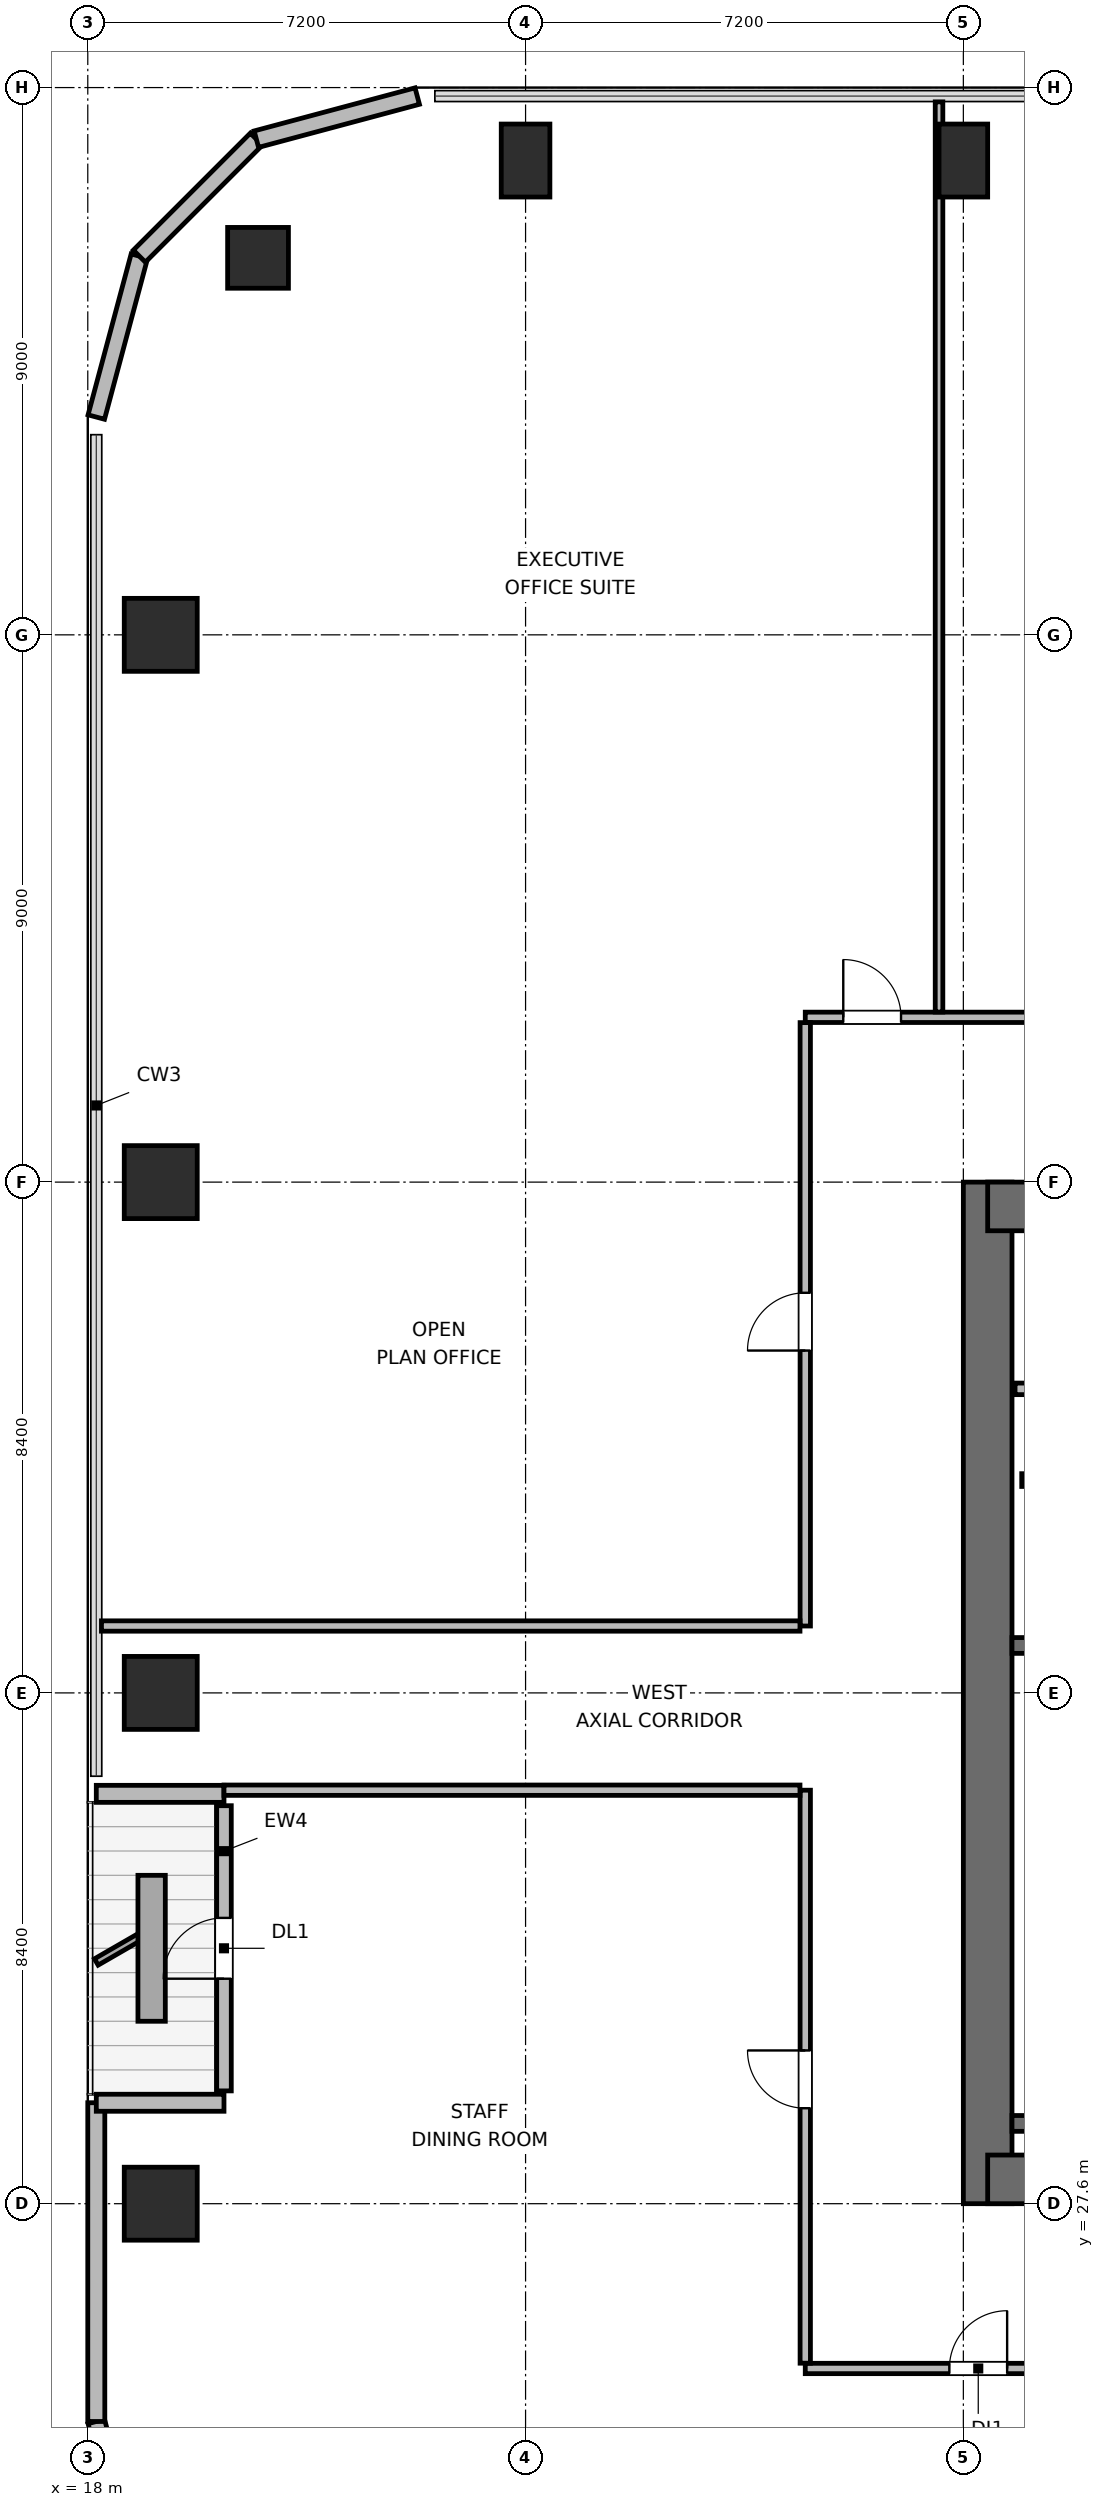
"""IFC4 building model, lengths in metres.
Left out: names, types, materials, properties, quantities, classifications, styles, units other than length and angle.
Written with IfcOpenShell. Run it as: python <this file> out.ifc"""

import sys

from ifc_helpers import new_model, si_unit, direction, frame, frame_2d, origin, origin_2d, place, context, subcontext, project, spatial, rectangle, circle, extrude, element, fill, save


model = new_model("IFC4")
c1 = context("Model", 3, precision=1e-05, world=origin(), true_north=direction((0.0, 1.0)))
c2 = subcontext(c1, "Body", "Model", "MODEL_VIEW")
j1 = project(units=[si_unit("LENGTHUNIT", "METRE"), si_unit("PLANEANGLEUNIT", "RADIAN")], contexts=[c1])
p1 = place(None, origin())
s1 = spatial("IfcSite", under=j1, at=p1, CompositionType="ELEMENT")
p2 = place(p1, origin())
s2 = spatial("IfcBuilding", under=s1, at=p2, CompositionType="ELEMENT")
p3 = place(p2, frame((0.0, 0.0, 170.1)))
s3 = spatial("IfcBuildingStorey", under=s2, at=p3, CompositionType="ELEMENT", Elevation=170.1)
p4 = place(p3, frame((32.8, 27.6, 0.0), z_axis=(0.0, 0.0, 1.0), x_axis=(0.0, 1.0, 0.0)))
e1 = element("IfcWall", 1, at=p4, inside=s3, PredefinedType="SHEAR", context=c2, shape_type="SweptSolid", body=[
    extrude(rectangle(XDim=16.8, YDim=0.8, at=frame_2d((8.4, 0.0))), origin(), (0.0, 0.0, 1.0), 3.9),
])
p5 = place(p3, frame((32.8, 28.0, 0.0), z_axis=(0.0, 0.0, 1.0), x_axis=(1.0, 0.0, 0.0)))
e2 = element("IfcWall", 2, at=p5, inside=s3, PredefinedType="SHEAR", context=c2, shape_type="SweptSolid", body=[
    extrude(rectangle(XDim=9.2, YDim=0.8, at=frame_2d((4.6, 0.0))), origin(), (0.0, 0.0, 1.0), 3.9),
])
p6 = place(p5, frame((5.025, 0.0, 0.0)))
e3 = element("IfcOpeningElement", 3, at=p6, cuts=e2, PredefinedType="OPENING", context=c2, shape_type="SweptSolid", body=[
    extrude(rectangle(XDim=1.05, YDim=2.04, at=frame_2d((0.525, 1.02))), frame((0.0, 0.41, 0.0), z_axis=(0.0, -1.0, 0.0), x_axis=(1.0, 0.0, 0.0)), (0.0, 0.0, 1.0), 0.82),
])
p7 = place(p3, frame((32.8, 44.0, 0.0), z_axis=(0.0, 0.0, 1.0), x_axis=(1.0, 0.0, 0.0)))
e4 = element("IfcWall", 4, at=p7, inside=s3, PredefinedType="SHEAR", context=c2, shape_type="SweptSolid", body=[
    extrude(rectangle(XDim=9.2, YDim=0.8, at=frame_2d((4.6, 0.0))), origin(), (0.0, 0.0, 1.0), 3.9),
])
p8 = place(p7, frame((1.025, 0.0, 0.0)))
e5 = element("IfcOpeningElement", 5, at=p8, cuts=e4, PredefinedType="OPENING", context=c2, shape_type="SweptSolid", body=[
    extrude(rectangle(XDim=0.95, YDim=2.04, at=frame_2d((0.475, 1.02))), frame((0.0, 0.41, 0.0), z_axis=(0.0, -1.0, 0.0), x_axis=(1.0, 0.0, 0.0)), (0.0, 0.0, 1.0), 0.82),
])
p9 = place(p7, frame((4.275, 0.0, 0.0)))
e6 = element("IfcOpeningElement", 6, at=p9, cuts=e4, PredefinedType="OPENING", context=c2, shape_type="SweptSolid", body=[
    extrude(rectangle(XDim=0.9, YDim=2.02, at=frame_2d((0.45, 1.01))), frame((0.0, 0.41, 0.0), z_axis=(0.0, -1.0, 0.0), x_axis=(1.0, 0.0, 0.0)), (0.0, 0.0, 1.0), 0.82),
])
p10 = place(p7, frame((7.175, 0.0, 0.0)))
e7 = element("IfcOpeningElement", 7, at=p10, cuts=e4, PredefinedType="OPENING", context=c2, shape_type="SweptSolid", body=[
    extrude(rectangle(XDim=0.9, YDim=2.02, at=frame_2d((0.45, 1.01))), frame((0.0, 0.41, 0.0), z_axis=(0.0, -1.0, 0.0), x_axis=(1.0, 0.0, 0.0)), (0.0, 0.0, 1.0), 0.82),
])
for number, where, z_axis, x_axis in (
    (8, (33.2, 28.92, 0.0), (0.0, 0.0, 1.0), (1.0, 0.0, 0.0)),
    (9, (33.2, 36.78, 0.0), (0.0, 0.0, 1.0), (1.0, 0.0, 0.0)),
):
    element("IfcWall", number, at=place(p3, frame(where, z_axis=z_axis, x_axis=x_axis)), inside=s3, PredefinedType="SHEAR", context=c2, shape_type="SweptSolid", body=[
        extrude(rectangle(XDim=3.91, YDim=0.26, at=frame_2d((1.955, 0.0))), origin(), (0.0, 0.0, 1.0), 3.9),
    ])
p11 = place(p3, frame((20.8, 59.6, 0.0), z_axis=(0.0, 0.0, 1.0), x_axis=(1.0, 0.0, 0.0)))
e10 = element("IfcColumn", 10, at=p11, inside=s3, PredefinedType="COLUMN", context=c2, shape_type="SweptSolid", body=[
    extrude(circle(Radius=0.5, at=origin_2d()), origin(), (0.0, 0.0, 1.0), 3.9),
])
for number, where, z_axis, x_axis in (
    (11, (25.2, 61.2, 0.0), (0.0, 0.0, 1.0), (1.0, 0.0, 0.0)),
    (12, (32.4, 61.2, 0.0), (0.0, 0.0, 1.0), (1.0, 0.0, 0.0)),
):
    element("IfcColumn", number, at=place(p3, frame(where, z_axis=z_axis, x_axis=x_axis)), inside=s3, PredefinedType="COLUMN", context=c2, shape_type="SweptSolid", body=[
        extrude(rectangle(XDim=0.8, YDim=1.2, at=origin_2d()), origin(), (0.0, 0.0, 1.0), 3.9),
    ])
for number, where, z_axis, x_axis in (
    (13, (19.2, 27.6, 0.0), (0.0, 0.0, 1.0), (1.0, 0.0, 0.0)),
    (14, (19.2, 36.0, 0.0), (0.0, 0.0, 1.0), (1.0, 0.0, 0.0)),
    (15, (19.2, 44.4, 0.0), (0.0, 0.0, 1.0), (1.0, 0.0, 0.0)),
    (16, (19.2, 53.4, 0.0), (0.0, 0.0, 1.0), (1.0, 0.0, 0.0)),
):
    element("IfcColumn", number, at=place(p3, frame(where, z_axis=z_axis, x_axis=x_axis)), inside=s3, PredefinedType="COLUMN", context=c2, shape_type="SweptSolid", body=[
        extrude(rectangle(XDim=1.2, YDim=1.2, at=origin_2d()), origin(), (0.0, 0.0, 1.0), 3.9),
    ])
p12 = place(p3, frame((18.848, 21.373, 0.0), z_axis=(0.0, 0.0, 1.0), x_axis=(-0.258672222976, 0.9659651552, 0.0)))
e17 = element("IfcWall", 17, at=p12, inside=s3, PredefinedType="SOLIDWALL", context=c2, shape_type="SweptSolid", body=[
    extrude(rectangle(XDim=2.739, YDim=0.28, at=frame_2d((1.37, 0.0))), origin(), (0.0, 0.0, 1.0), 3.68),
])
p13 = place(p3, frame((18.14, 24.018, 0.0), z_axis=(0.0, 0.0, 1.0), x_axis=(0.0, 1.0, 0.0)))
e18 = element("IfcWall", 18, at=p13, inside=s3, PredefinedType="SOLIDWALL", context=c2, shape_type="SweptSolid", body=[
    extrude(rectangle(XDim=5.242, YDim=0.28, at=frame_2d((2.621, 0.0))), origin(), (0.0, 0.0, 1.0), 3.68),
])
p14 = place(p3, frame((18.14, 29.26, 0.0), z_axis=(0.0, 0.0, 1.0), x_axis=(1.0, 0.0, 0.0)))
e19 = element("IfcWall", 19, at=p14, inside=s3, PredefinedType="SOLIDWALL", context=c2, shape_type="SweptSolid", body=[
    extrude(rectangle(XDim=2.1, YDim=0.28, at=frame_2d((1.05, 0.0))), origin(), (0.0, 0.0, 1.0), 3.116),
])
p15 = place(p3, frame((20.24, 29.455, 0.0), z_axis=(0.0, 0.0, 1.0), x_axis=(0.0, 1.0, 0.0)))
e20 = element("IfcWall", 20, at=p15, inside=s3, PredefinedType="SOLIDWALL", context=c2, shape_type="SweptSolid", body=[
    extrude(rectangle(XDim=4.69, YDim=0.24, at=frame_2d((2.345, 0.0))), origin(), (0.0, 0.0, 1.0), 3.248),
])
p16 = place(p15, frame((1.845, 0.0, 0.0)))
e21 = element("IfcOpeningElement", 21, at=p16, cuts=e20, PredefinedType="OPENING", context=c2, shape_type="SweptSolid", body=[
    extrude(rectangle(XDim=1.0, YDim=2.02, at=frame_2d((0.5, 1.01))), frame((0.0, 0.13, 0.0), z_axis=(0.0, -1.0, 0.0), x_axis=(1.0, 0.0, 0.0)), (0.0, 0.0, 1.0), 0.26),
])
p17 = place(p3, frame((20.24, 34.34, 0.0), z_axis=(0.0, 0.0, 1.0), x_axis=(-1.0, 0.0, 0.0)))
e22 = element("IfcWall", 22, at=p17, inside=s3, PredefinedType="SOLIDWALL", context=c2, shape_type="SweptSolid", body=[
    extrude(rectangle(XDim=2.1, YDim=0.28, at=frame_2d((1.05, 0.0))), origin(), (0.0, 0.0, 1.0), 3.116),
])
p18 = place(p3, frame((18.14, 56.982, 0.0), z_axis=(0.0, 0.0, 1.0), x_axis=(0.258672222976, 0.9659651552, 0.0)))
e23 = element("IfcWall", 23, at=p18, inside=s3, PredefinedType="SOLIDWALL", context=c2, shape_type="SweptSolid", body=[
    extrude(rectangle(XDim=2.739, YDim=0.28, at=frame_2d((1.37, 0.0))), origin(), (0.0, 0.0, 1.0), 3.68),
])
p19 = place(p3, frame((18.848, 59.627, 0.0), z_axis=(0.0, 0.0, 1.0), x_axis=(0.707106781187, 0.707106781187, 0.0)))
e24 = element("IfcWall", 24, at=p19, inside=s3, PredefinedType="SOLIDWALL", context=c2, shape_type="SweptSolid", body=[
    extrude(rectangle(XDim=2.721, YDim=0.28, at=frame_2d((1.36, 0.0))), origin(), (0.0, 0.0, 1.0), 3.68),
])
p20 = place(p3, frame((20.772, 61.552, 0.0), z_axis=(0.0, 0.0, 1.0), x_axis=(0.965971118627, 0.258649952598, 0.0)))
e25 = element("IfcWall", 25, at=p20, inside=s3, PredefinedType="SOLIDWALL", context=c2, shape_type="SweptSolid", body=[
    extrude(rectangle(XDim=2.739, YDim=0.28, at=frame_2d((1.37, 0.0))), origin(), (0.0, 0.0, 1.0), 3.68),
])
p21 = place(p3, frame((33.25, 41.0, 0.0), z_axis=(0.0, 0.0, 1.0), x_axis=(1.0, 0.0, 0.0)))
e26 = element("IfcWall", 26, at=p21, inside=s3, PredefinedType="PLUMBINGWALL", context=c2, shape_type="SweptSolid", body=[
    extrude(rectangle(XDim=8.3, YDim=0.19, at=frame_2d((4.15, 0.0))), origin(), (0.0, 0.0, 1.0), 3.68),
])
p22 = place(p3, frame((33.36, 39.5, 0.0), z_axis=(0.0, 0.0, 1.0), x_axis=(1.0, 0.0, 0.0)))
e27 = element("IfcWall", 27, at=p22, inside=s3, PredefinedType="PARTITIONING", context=c2, shape_type="SweptSolid", body=[
    extrude(rectangle(XDim=1.86, YDim=0.21, at=frame_2d((0.93, 0.0))), origin(), (0.0, 0.0, 1.0), 3.68),
])
p23 = place(p3, frame((29.8, 24.89, 0.0), z_axis=(0.0, 0.0, 1.0), x_axis=(1.0, 0.0, 0.0)))
e28 = element("IfcWall", 28, at=p23, inside=s3, PredefinedType="PARTITIONING", context=c2, shape_type="SweptSolid", body=[
    extrude(rectangle(XDim=33.8, YDim=0.17, at=frame_2d((16.9, 0.0))), origin(), (0.0, 0.0, 1.0), 3.68),
])
p24 = place(p23, frame((2.37, 0.0, 0.0)))
e29 = element("IfcOpeningElement", 29, at=p24, cuts=e28, PredefinedType="OPENING", context=c2, shape_type="SweptSolid", body=[
    extrude(rectangle(XDim=0.95, YDim=2.04, at=frame_2d((0.475, 1.02))), frame((0.0, 0.095, 0.0), z_axis=(0.0, -1.0, 0.0), x_axis=(1.0, 0.0, 0.0)), (0.0, 0.0, 1.0), 0.19),
])
p25 = place(p23, frame((7.455, 0.0, 0.0)))
e30 = element("IfcOpeningElement", 30, at=p25, cuts=e28, PredefinedType="OPENING", context=c2, shape_type="SweptSolid", body=[
    extrude(rectangle(XDim=0.95, YDim=2.04, at=frame_2d((0.475, 1.02))), frame((0.0, 0.095, 0.0), z_axis=(0.0, -1.0, 0.0), x_axis=(1.0, 0.0, 0.0)), (0.0, 0.0, 1.0), 0.19),
])
p26 = place(p23, frame((11.51, 0.0, 0.0)))
e31 = element("IfcOpeningElement", 31, at=p26, cuts=e28, PredefinedType="OPENING", context=c2, shape_type="SweptSolid", body=[
    extrude(rectangle(XDim=0.95, YDim=2.04, at=frame_2d((0.475, 1.02))), frame((0.0, 0.095, 0.0), z_axis=(0.0, -1.0, 0.0), x_axis=(1.0, 0.0, 0.0)), (0.0, 0.0, 1.0), 0.19),
])
p27 = place(p23, frame((15.995, 0.0, 0.0)))
e32 = element("IfcOpeningElement", 32, at=p27, cuts=e28, PredefinedType="OPENING", context=c2, shape_type="SweptSolid", body=[
    extrude(rectangle(XDim=0.95, YDim=2.04, at=frame_2d((0.475, 1.02))), frame((0.0, 0.095, 0.0), z_axis=(0.0, -1.0, 0.0), x_axis=(1.0, 0.0, 0.0)), (0.0, 0.0, 1.0), 0.19),
])
p28 = place(p23, frame((20.91, 0.0, 0.0)))
e33 = element("IfcOpeningElement", 33, at=p28, cuts=e28, PredefinedType="OPENING", context=c2, shape_type="SweptSolid", body=[
    extrude(rectangle(XDim=0.95, YDim=2.04, at=frame_2d((0.475, 1.02))), frame((0.0, 0.095, 0.0), z_axis=(0.0, -1.0, 0.0), x_axis=(1.0, 0.0, 0.0)), (0.0, 0.0, 1.0), 0.19),
])
p29 = place(p23, frame((25.395, 0.0, 0.0)))
e34 = element("IfcOpeningElement", 34, at=p29, cuts=e28, PredefinedType="OPENING", context=c2, shape_type="SweptSolid", body=[
    extrude(rectangle(XDim=0.95, YDim=2.04, at=frame_2d((0.475, 1.02))), frame((0.0, 0.095, 0.0), z_axis=(0.0, -1.0, 0.0), x_axis=(1.0, 0.0, 0.0)), (0.0, 0.0, 1.0), 0.19),
])
p30 = place(p23, frame((30.48, 0.0, 0.0)))
e35 = element("IfcOpeningElement", 35, at=p30, cuts=e28, PredefinedType="OPENING", context=c2, shape_type="SweptSolid", body=[
    extrude(rectangle(XDim=0.95, YDim=2.04, at=frame_2d((0.475, 1.02))), frame((0.0, 0.095, 0.0), z_axis=(0.0, -1.0, 0.0), x_axis=(1.0, 0.0, 0.0)), (0.0, 0.0, 1.0), 0.19),
])
p31 = place(p3, frame((29.8, 47.11, 0.0), z_axis=(0.0, 0.0, 1.0), x_axis=(1.0, 0.0, 0.0)))
e36 = element("IfcWall", 36, at=p31, inside=s3, PredefinedType="PARTITIONING", context=c2, shape_type="SweptSolid", body=[
    extrude(rectangle(XDim=33.8, YDim=0.17, at=frame_2d((16.9, 0.0))), origin(), (0.0, 0.0, 1.0), 3.68),
])
p32 = place(p31, frame((0.625, 0.0, 0.0)))
e37 = element("IfcOpeningElement", 37, at=p32, cuts=e36, PredefinedType="OPENING", context=c2, shape_type="SweptSolid", body=[
    extrude(rectangle(XDim=0.95, YDim=2.04, at=frame_2d((0.475, 1.02))), frame((0.0, 0.095, 0.0), z_axis=(0.0, -1.0, 0.0), x_axis=(1.0, 0.0, 0.0)), (0.0, 0.0, 1.0), 0.19),
])
p33 = place(p31, frame((6.185, 0.0, 0.0)))
e38 = element("IfcOpeningElement", 38, at=p33, cuts=e36, PredefinedType="OPENING", context=c2, shape_type="SweptSolid", body=[
    extrude(rectangle(XDim=0.95, YDim=2.04, at=frame_2d((0.475, 1.02))), frame((0.0, 0.095, 0.0), z_axis=(0.0, -1.0, 0.0), x_axis=(1.0, 0.0, 0.0)), (0.0, 0.0, 1.0), 0.19),
])
p34 = place(p31, frame((12.465, 0.0, 0.0)))
e39 = element("IfcOpeningElement", 39, at=p34, cuts=e36, PredefinedType="OPENING", context=c2, shape_type="SweptSolid", body=[
    extrude(rectangle(XDim=0.95, YDim=2.04, at=frame_2d((0.475, 1.02))), frame((0.0, 0.095, 0.0), z_axis=(0.0, -1.0, 0.0), x_axis=(1.0, 0.0, 0.0)), (0.0, 0.0, 1.0), 0.19),
])
p35 = place(p31, frame((20.065, 0.0, 0.0)))
e40 = element("IfcOpeningElement", 40, at=p35, cuts=e36, PredefinedType="OPENING", context=c2, shape_type="SweptSolid", body=[
    extrude(rectangle(XDim=0.95, YDim=2.04, at=frame_2d((0.475, 1.02))), frame((0.0, 0.095, 0.0), z_axis=(0.0, -1.0, 0.0), x_axis=(1.0, 0.0, 0.0)), (0.0, 0.0, 1.0), 0.19),
])
p36 = place(p31, frame((29.585, 0.0, 0.0)))
e41 = element("IfcOpeningElement", 41, at=p36, cuts=e36, PredefinedType="OPENING", context=c2, shape_type="SweptSolid", body=[
    extrude(rectangle(XDim=0.95, YDim=2.04, at=frame_2d((0.475, 1.02))), frame((0.0, 0.095, 0.0), z_axis=(0.0, -1.0, 0.0), x_axis=(1.0, 0.0, 0.0)), (0.0, 0.0, 1.0), 0.19),
])
p37 = place(p3, frame((29.8, 24.977, 0.0), z_axis=(0.0, 0.0, 1.0), x_axis=(0.0, 1.0, 0.0)))
e42 = element("IfcWall", 42, at=p37, inside=s3, PredefinedType="PARTITIONING", context=c2, shape_type="SweptSolid", body=[
    extrude(rectangle(XDim=9.423, YDim=0.17, at=frame_2d((4.711, 0.0))), origin(), (0.0, 0.0, 1.0), 3.68),
])
p38 = place(p37, frame((4.193, 0.0, 0.0)))
e43 = element("IfcOpeningElement", 43, at=p38, cuts=e42, PredefinedType="OPENING", context=c2, shape_type="SweptSolid", body=[
    extrude(rectangle(XDim=0.95, YDim=2.04, at=frame_2d((0.475, 1.02))), frame((0.0, 0.095, 0.0), z_axis=(0.0, -1.0, 0.0), x_axis=(1.0, 0.0, 0.0)), (0.0, 0.0, 1.0), 0.19),
])
p39 = place(p3, frame((29.8, 37.1, 0.0), z_axis=(0.0, 0.0, 1.0), x_axis=(0.0, 1.0, 0.0)))
e44 = element("IfcWall", 44, at=p39, inside=s3, PredefinedType="PARTITIONING", context=c2, shape_type="SweptSolid", body=[
    extrude(rectangle(XDim=9.923, YDim=0.17, at=frame_2d((4.961, 0.0))), origin(), (0.0, 0.0, 1.0), 3.68),
])
p40 = place(p39, frame((4.53, 0.0, 0.0)))
e45 = element("IfcOpeningElement", 45, at=p40, cuts=e44, PredefinedType="OPENING", context=c2, shape_type="SweptSolid", body=[
    extrude(rectangle(XDim=0.95, YDim=2.04, at=frame_2d((0.475, 1.02))), frame((0.0, 0.095, 0.0), z_axis=(0.0, -1.0, 0.0), x_axis=(1.0, 0.0, 0.0)), (0.0, 0.0, 1.0), 0.19),
])
p41 = place(p3, frame((32.0, 47.197, 0.0), z_axis=(0.0, 0.0, 1.0), x_axis=(0.0, 1.0, 0.0)))
e46 = element("IfcWall", 46, at=p41, inside=s3, PredefinedType="PARTITIONING", context=c2, shape_type="SweptSolid", body=[
    extrude(rectangle(XDim=14.968, YDim=0.125, at=frame_2d((7.484, 0.0))), origin(), (0.0, 0.0, 1.0), 3.68),
])
p42 = place(p3, frame((20.24, 34.4, 0.0), z_axis=(0.0, 0.0, 1.0), x_axis=(1.0, 0.0, 0.0)))
e47 = element("IfcWall", 47, at=p42, inside=s3, PredefinedType="PARTITIONING", context=c2, shape_type="SweptSolid", body=[
    extrude(rectangle(XDim=9.473, YDim=0.17, at=frame_2d((4.736, 0.0))), origin(), (0.0, 0.0, 1.0), 3.68),
])
p43 = place(p3, frame((18.225, 37.1, 0.0), z_axis=(0.0, 0.0, 1.0), x_axis=(1.0, 0.0, 0.0)))
e48 = element("IfcWall", 48, at=p43, inside=s3, PredefinedType="PARTITIONING", context=c2, shape_type="SweptSolid", body=[
    extrude(rectangle(XDim=11.488, YDim=0.17, at=frame_2d((5.744, 0.0))), origin(), (0.0, 0.0, 1.0), 3.68),
])
p44 = place(p16, origin())
e49 = element("IfcDoor", 49, at=p44, inside=s3, OperationType="SINGLE_SWING_LEFT", PredefinedType="DOOR", context=c2, shape_type="SweptSolid", body=[
    extrude(rectangle(XDim=1.0, YDim=2.02, at=frame_2d((0.5, 1.01))), frame((0.0, 0.025, 0.0), z_axis=(0.0, -1.0, 0.0), x_axis=(1.0, 0.0, 0.0)), (0.0, 0.0, 1.0), 0.05),
])
fill(e21, e49)
p45 = place(p24, origin())
e50 = element("IfcDoor", 50, at=p45, inside=s3, OperationType="SINGLE_SWING_RIGHT", PredefinedType="DOOR", context=c2, shape_type="SweptSolid", body=[
    extrude(rectangle(XDim=0.95, YDim=2.04, at=frame_2d((0.475, 1.02))), frame((0.0, 0.025, 0.0), z_axis=(0.0, -1.0, 0.0), x_axis=(1.0, 0.0, 0.0)), (0.0, 0.0, 1.0), 0.05),
])
fill(e29, e50)
p46 = place(p32, origin())
e51 = element("IfcDoor", 51, at=p46, inside=s3, OperationType="SINGLE_SWING_LEFT", PredefinedType="DOOR", context=c2, shape_type="SweptSolid", body=[
    extrude(rectangle(XDim=0.95, YDim=2.04, at=frame_2d((0.475, 1.02))), frame((0.0, 0.025, 0.0), z_axis=(0.0, -1.0, 0.0), x_axis=(1.0, 0.0, 0.0)), (0.0, 0.0, 1.0), 0.05),
])
fill(e37, e51)
p47 = place(p38, origin())
e52 = element("IfcDoor", 52, at=p47, inside=s3, OperationType="SINGLE_SWING_RIGHT", PredefinedType="DOOR", context=c2, shape_type="SweptSolid", body=[
    extrude(rectangle(XDim=0.95, YDim=2.04, at=frame_2d((0.475, 1.02))), frame((0.0, 0.025, 0.0), z_axis=(0.0, -1.0, 0.0), x_axis=(1.0, 0.0, 0.0)), (0.0, 0.0, 1.0), 0.05),
])
fill(e43, e52)
p48 = place(p40, origin())
e53 = element("IfcDoor", 53, at=p48, inside=s3, OperationType="SINGLE_SWING_LEFT", PredefinedType="DOOR", context=c2, shape_type="SweptSolid", body=[
    extrude(rectangle(XDim=0.95, YDim=2.04, at=frame_2d((0.475, 1.02))), frame((0.0, 0.025, 0.0), z_axis=(0.0, -1.0, 0.0), x_axis=(1.0, 0.0, 0.0)), (0.0, 0.0, 1.0), 0.05),
])
fill(e45, e53)
save(model, sys.argv[1])
